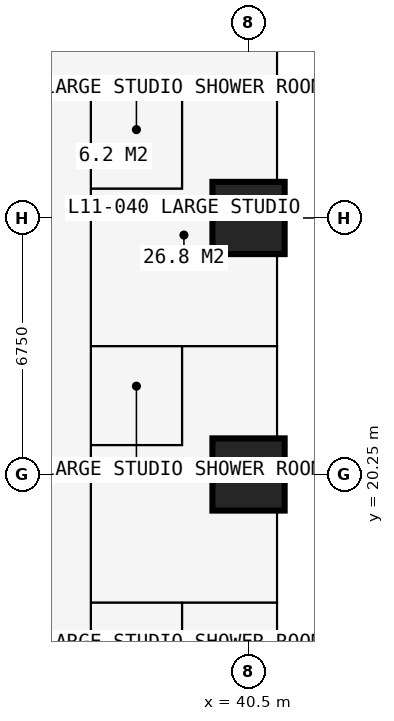
"""IFC4 building model, lengths in metres.
Left out: names, types, materials, properties, quantities, classifications, styles, units other than length and angle.
Written with IfcOpenShell. Run it as: python <this file> out.ifc"""

import sys

from ifc_helpers import new_model, si_unit, direction, frame, frame_2d, origin, origin_2d, place, context, subcontext, project, spatial, rectangle, extrude, element, fill, save


model = new_model("IFC4")
c1 = context("Model", 3, precision=1e-05, world=origin(), true_north=direction((0.0, 1.0)))
c2 = subcontext(c1, "Body", "Model", "MODEL_VIEW")
j1 = project(units=[si_unit("LENGTHUNIT", "METRE"), si_unit("PLANEANGLEUNIT", "RADIAN")], contexts=[c1])
p1 = place(None, origin())
s1 = spatial("IfcSite", under=j1, at=p1, CompositionType="ELEMENT")
p2 = place(p1, origin())
s2 = spatial("IfcBuilding", under=s1, at=p2, CompositionType="ELEMENT")
p3 = place(p2, frame((0.0, 0.0, 43.2)))
s3 = spatial("IfcBuildingStorey", under=s2, at=p3, CompositionType="ELEMENT", Elevation=43.2)
for number, where, z_axis, x_axis in (
    (1, (40.5, 20.25, 0.0), (0.0, 0.0, 1.0), (1.0, 0.0, 0.0)),
    (2, (40.5, 27.0, 0.0), (0.0, 0.0, 1.0), (1.0, 0.0, 0.0)),
):
    element("IfcColumn", number, at=place(p3, frame(where, z_axis=z_axis, x_axis=x_axis)), inside=s3, PredefinedType="COLUMN", context=c2, shape_type="SweptSolid", body=[
        extrude(rectangle(XDim=1.9, YDim=1.9, at=origin_2d()), origin(), (0.0, 0.0, 1.0), 3.6),
    ])
p4 = place(p3, frame((41.25, 27.0, 0.0), z_axis=(0.0, 0.0, 1.0), x_axis=(0.0, -1.0, 0.0)))
e3 = element("IfcWall", 3, at=p4, inside=s3, PredefinedType="SOLIDWALL", context=c2, shape_type="SweptSolid", body=[
    extrude(rectangle(XDim=6.75, YDim=0.15, at=frame_2d((3.375, 0.0))), origin(), (0.0, 0.0, 1.0), 3.375),
])
p5 = place(p4, frame((0.996, 0.0, 0.0)))
e4 = element("IfcOpeningElement", 4, at=p5, cuts=e3, PredefinedType="OPENING", context=c2, shape_type="SweptSolid", body=[
    extrude(rectangle(XDim=1.0, YDim=2.2, at=frame_2d((0.5, 1.1))), frame((0.0, 0.085, 0.0), z_axis=(0.0, -1.0, 0.0), x_axis=(1.0, 0.0, 0.0)), (0.0, 0.0, 1.0), 0.17),
])
p6 = place(p4, frame((2.042, 0.0, 0.9)))
e5 = element("IfcOpeningElement", 5, at=p6, cuts=e3, PredefinedType="OPENING", context=c2, shape_type="SweptSolid", body=[
    extrude(rectangle(XDim=1.2, YDim=1.8, at=frame_2d((0.6, 0.9))), frame((0.0, 0.085, 0.0), z_axis=(0.0, -1.0, 0.0), x_axis=(1.0, 0.0, 0.0)), (0.0, 0.0, 1.0), 0.17),
])
p7 = place(p4, frame((4.754, 0.0, 0.0)))
e6 = element("IfcOpeningElement", 6, at=p7, cuts=e3, PredefinedType="OPENING", context=c2, shape_type="SweptSolid", body=[
    extrude(rectangle(XDim=1.0, YDim=2.2, at=frame_2d((0.5, 1.1))), frame((0.0, 0.085, 0.0), z_axis=(0.0, -1.0, 0.0), x_axis=(1.0, 0.0, 0.0)), (0.0, 0.0, 1.0), 0.17),
])
p8 = place(p4, frame((3.508, 0.0, 0.9)))
e7 = element("IfcOpeningElement", 7, at=p8, cuts=e3, PredefinedType="OPENING", context=c2, shape_type="SweptSolid", body=[
    extrude(rectangle(XDim=1.2, YDim=1.8, at=frame_2d((0.6, 0.9))), frame((0.0, 0.085, 0.0), z_axis=(0.0, -1.0, 0.0), x_axis=(1.0, 0.0, 0.0)), (0.0, 0.0, 1.0), 0.17),
])
p9 = place(p3, frame((41.35, 23.625, 0.0), z_axis=(0.0, 0.0, 1.0), x_axis=(1.0, 0.0, 0.0)))
e8 = element("IfcWall", 8, at=p9, inside=s3, PredefinedType="USERDEFINED", context=c2, shape_type="SweptSolid", body=[
    extrude(rectangle(XDim=2.2, YDim=1.0, at=frame_2d((1.1, 0.0))), origin(), (0.0, 0.0, 1.0), 0.9),
])
p10 = place(p3, frame((30.375, 30.375, 0.0), z_axis=(0.0, 0.0, 1.0), x_axis=(1.0, 0.0, 0.0)))
e9 = element("IfcWall", 9, at=p10, inside=s3, PredefinedType="PARTITIONING", context=c2, shape_type="SweptSolid", body=[
    extrude(rectangle(XDim=10.859, YDim=0.15, at=frame_2d((5.429, 0.0))), origin(), (0.0, 0.0, 1.0), 3.375),
])
p11 = place(p3, frame((36.35, 6.75, 0.0), z_axis=(0.0, 0.0, 1.0), x_axis=(0.0, 1.0, 0.0)))
e10 = element("IfcWall", 10, at=p11, inside=s3, PredefinedType="PARTITIONING", context=c2, shape_type="SweptSolid", body=[
    extrude(rectangle(XDim=23.625, YDim=0.15, at=frame_2d((11.812, 0.0))), origin(), (0.0, 0.0, 1.0), 3.375),
])
p12 = place(p11, frame((0.2, 0.0, 0.0)))
e11 = element("IfcOpeningElement", 11, at=p12, cuts=e10, PredefinedType="OPENING", context=c2, shape_type="SweptSolid", body=[
    extrude(rectangle(XDim=0.95, YDim=2.2, at=frame_2d((0.475, 1.1))), frame((0.0, 0.085, 0.0), z_axis=(0.0, -1.0, 0.0), x_axis=(1.0, 0.0, 0.0)), (0.0, 0.0, 1.0), 0.17),
])
p13 = place(p11, frame((18.475, 0.0, 0.0)))
e12 = element("IfcOpeningElement", 12, at=p13, cuts=e10, PredefinedType="OPENING", context=c2, shape_type="SweptSolid", body=[
    extrude(rectangle(XDim=0.95, YDim=2.2, at=frame_2d((0.475, 1.1))), frame((0.0, 0.085, 0.0), z_axis=(0.0, -1.0, 0.0), x_axis=(1.0, 0.0, 0.0)), (0.0, 0.0, 1.0), 0.17),
])
p14 = place(p11, frame((11.725, 0.0, 0.0)))
e13 = element("IfcOpeningElement", 13, at=p14, cuts=e10, PredefinedType="OPENING", context=c2, shape_type="SweptSolid", body=[
    extrude(rectangle(XDim=0.95, YDim=2.2, at=frame_2d((0.475, 1.1))), frame((0.0, 0.085, 0.0), z_axis=(0.0, -1.0, 0.0), x_axis=(1.0, 0.0, 0.0)), (0.0, 0.0, 1.0), 0.17),
])
p15 = place(p11, frame((4.975, 0.0, 0.0)))
e14 = element("IfcOpeningElement", 14, at=p15, cuts=e10, PredefinedType="OPENING", context=c2, shape_type="SweptSolid", body=[
    extrude(rectangle(XDim=0.95, YDim=2.2, at=frame_2d((0.475, 1.1))), frame((0.0, 0.085, 0.0), z_axis=(0.0, -1.0, 0.0), x_axis=(1.0, 0.0, 0.0)), (0.0, 0.0, 1.0), 0.17),
])
p16 = place(p3, frame((36.35, 16.875, 0.0), z_axis=(0.0, 0.0, 1.0), x_axis=(1.0, 0.0, 0.0)))
e15 = element("IfcWall", 15, at=p16, inside=s3, PredefinedType="PARTITIONING", context=c2, shape_type="SweptSolid", body=[
    extrude(rectangle(XDim=4.884, YDim=0.175, at=frame_2d((2.442, 0.0))), origin(), (0.0, 0.0, 1.0), 3.375),
])
p17 = place(p16, frame((0.75, 0.0, 0.0)))
e16 = element("IfcOpeningElement", 16, at=p17, cuts=e15, PredefinedType="OPENING", context=c2, shape_type="SweptSolid", body=[
    extrude(rectangle(XDim=0.9, YDim=2.2, at=frame_2d((0.45, 1.1))), frame((0.0, 0.097, 0.0), z_axis=(0.0, -1.0, 0.0), x_axis=(1.0, 0.0, 0.0)), (0.0, 0.0, 1.0), 0.195),
])
p18 = place(p3, frame((36.35, 21.025, 0.0), z_axis=(0.0, 0.0, 1.0), x_axis=(1.0, 0.0, 0.0)))
e17 = element("IfcWall", 17, at=p18, inside=s3, PredefinedType="PARTITIONING", context=c2, shape_type="SweptSolid", body=[
    extrude(rectangle(XDim=2.4, YDim=0.1, at=frame_2d((1.2, 0.0))), origin(), (0.0, 0.0, 1.0), 3.375),
])
p19 = place(p3, frame((36.35, 23.625, 0.0), z_axis=(0.0, 0.0, 1.0), x_axis=(1.0, 0.0, 0.0)))
e18 = element("IfcWall", 18, at=p19, inside=s3, PredefinedType="PARTITIONING", context=c2, shape_type="SweptSolid", body=[
    extrude(rectangle(XDim=4.884, YDim=0.175, at=frame_2d((2.442, 0.0))), origin(), (0.0, 0.0, 1.0), 3.375),
])
p20 = place(p19, frame((0.75, 0.0, 0.0)))
e19 = element("IfcOpeningElement", 19, at=p20, cuts=e18, PredefinedType="OPENING", context=c2, shape_type="SweptSolid", body=[
    extrude(rectangle(XDim=0.9, YDim=2.2, at=frame_2d((0.45, 1.1))), frame((0.0, 0.097, 0.0), z_axis=(0.0, -1.0, 0.0), x_axis=(1.0, 0.0, 0.0)), (0.0, 0.0, 1.0), 0.195),
])
p21 = place(p3, frame((36.35, 27.775, 0.0), z_axis=(0.0, 0.0, 1.0), x_axis=(1.0, 0.0, 0.0)))
e20 = element("IfcWall", 20, at=p21, inside=s3, PredefinedType="PARTITIONING", context=c2, shape_type="SweptSolid", body=[
    extrude(rectangle(XDim=2.4, YDim=0.1, at=frame_2d((1.2, 0.0))), origin(), (0.0, 0.0, 1.0), 3.375),
])
for number, where, z_axis, x_axis in (
    (21, (38.75, 14.275, 0.0), (0.0, 0.0, 1.0), (0.0, 1.0, 0.0)),
    (22, (38.75, 21.025, 0.0), (0.0, 0.0, 1.0), (0.0, 1.0, 0.0)),
):
    element("IfcWall", number, at=place(p3, frame(where, z_axis=z_axis, x_axis=x_axis)), inside=s3, PredefinedType="PARTITIONING", context=c2, shape_type="SweptSolid", body=[
        extrude(rectangle(XDim=2.6, YDim=0.1, at=frame_2d((1.3, 0.0))), origin(), (0.0, 0.0, 1.0), 3.375),
    ])
p22 = place(p3, frame((38.75, 27.775, 0.0), z_axis=(0.0, 0.0, 1.0), x_axis=(0.0, 1.0, 0.0)))
e23 = element("IfcWall", 23, at=p22, inside=s3, PredefinedType="PARTITIONING", context=c2, shape_type="SweptSolid", body=[
    extrude(rectangle(XDim=2.6, YDim=0.1, at=frame_2d((1.3, 0.0))), origin(), (0.0, 0.0, 1.0), 3.375),
])
p23 = place(p22, frame((0.85, 0.0, 0.0)))
e24 = element("IfcOpeningElement", 24, at=p23, cuts=e23, PredefinedType="OPENING", context=c2, shape_type="SweptSolid", body=[
    extrude(rectangle(XDim=0.9, YDim=2.2, at=frame_2d((0.45, 1.1))), frame((0.0, 0.06, 0.0), z_axis=(0.0, -1.0, 0.0), x_axis=(1.0, 0.0, 0.0)), (0.0, 0.0, 1.0), 0.12),
])
p24 = place(p5, origin())
e25 = element("IfcDoor", 25, at=p24, inside=s3, OperationType="SINGLE_SWING_LEFT", PredefinedType="DOOR", context=c2, shape_type="SweptSolid", body=[
    extrude(rectangle(XDim=1.0, YDim=2.2, at=frame_2d((0.5, 1.1))), frame((0.0, 0.025, 0.0), z_axis=(0.0, -1.0, 0.0), x_axis=(1.0, 0.0, 0.0)), (0.0, 0.0, 1.0), 0.05),
])
fill(e4, e25)
p25 = place(p6, origin())
e26 = element("IfcWindow", 26, at=p25, inside=s3, PartitioningType="SINGLE_PANEL", PredefinedType="WINDOW", context=c2, shape_type="SweptSolid", body=[
    extrude(rectangle(XDim=1.2, YDim=1.8, at=frame_2d((0.6, 0.9))), frame((0.0, 0.03, 0.0), z_axis=(0.0, -1.0, 0.0), x_axis=(1.0, 0.0, 0.0)), (0.0, 0.0, 1.0), 0.06),
])
fill(e5, e26)
p26 = place(p7, origin())
e27 = element("IfcDoor", 27, at=p26, inside=s3, OperationType="SINGLE_SWING_RIGHT", PredefinedType="DOOR", context=c2, shape_type="SweptSolid", body=[
    extrude(rectangle(XDim=1.0, YDim=2.2, at=frame_2d((0.5, 1.1))), frame((0.0, 0.025, 0.0), z_axis=(0.0, -1.0, 0.0), x_axis=(1.0, 0.0, 0.0)), (0.0, 0.0, 1.0), 0.05),
])
fill(e6, e27)
p27 = place(p8, origin())
e28 = element("IfcWindow", 28, at=p27, inside=s3, PartitioningType="SINGLE_PANEL", PredefinedType="WINDOW", context=c2, shape_type="SweptSolid", body=[
    extrude(rectangle(XDim=1.2, YDim=1.8, at=frame_2d((0.6, 0.9))), frame((0.0, 0.03, 0.0), z_axis=(0.0, -1.0, 0.0), x_axis=(1.0, 0.0, 0.0)), (0.0, 0.0, 1.0), 0.06),
])
fill(e7, e28)
p28 = place(p13, origin())
e29 = element("IfcDoor", 29, at=p28, inside=s3, OperationType="SINGLE_SWING_LEFT", PredefinedType="DOOR", context=c2, shape_type="SweptSolid", body=[
    extrude(rectangle(XDim=0.95, YDim=2.2, at=frame_2d((0.475, 1.1))), frame((0.0, 0.025, 0.0), z_axis=(0.0, -1.0, 0.0), x_axis=(1.0, 0.0, 0.0)), (0.0, 0.0, 1.0), 0.05),
])
fill(e12, e29)
p29 = place(p23, origin())
e30 = element("IfcDoor", 30, at=p29, inside=s3, OperationType="SINGLE_SWING_RIGHT", PredefinedType="DOOR", context=c2, shape_type="SweptSolid", body=[
    extrude(rectangle(XDim=0.9, YDim=2.2, at=frame_2d((0.45, 1.1))), frame((0.0, 0.025, 0.0), z_axis=(0.0, -1.0, 0.0), x_axis=(1.0, 0.0, 0.0)), (0.0, 0.0, 1.0), 0.05),
])
fill(e24, e30)
p30 = place(p14, origin())
e31 = element("IfcDoor", 31, at=p30, inside=s3, OperationType="SINGLE_SWING_LEFT", PredefinedType="DOOR", context=c2, shape_type="SweptSolid", body=[
    extrude(rectangle(XDim=0.95, YDim=2.2, at=frame_2d((0.475, 1.1))), frame((0.0, 0.025, 0.0), z_axis=(0.0, -1.0, 0.0), x_axis=(1.0, 0.0, 0.0)), (0.0, 0.0, 1.0), 0.05),
])
fill(e13, e31)
p31 = place(p20, origin())
e32 = element("IfcDoor", 32, at=p31, inside=s3, OperationType="SINGLE_SWING_RIGHT", PredefinedType="DOOR", context=c2, shape_type="SweptSolid", body=[
    extrude(rectangle(XDim=0.9, YDim=2.2, at=frame_2d((0.45, 1.1))), frame((0.0, 0.025, 0.0), z_axis=(0.0, -1.0, 0.0), x_axis=(1.0, 0.0, 0.0)), (0.0, 0.0, 1.0), 0.05),
])
fill(e19, e32)
p32 = place(p17, origin())
e33 = element("IfcDoor", 33, at=p32, inside=s3, OperationType="SINGLE_SWING_RIGHT", PredefinedType="DOOR", context=c2, shape_type="SweptSolid", body=[
    extrude(rectangle(XDim=0.9, YDim=2.2, at=frame_2d((0.45, 1.1))), frame((0.0, 0.025, 0.0), z_axis=(0.0, -1.0, 0.0), x_axis=(1.0, 0.0, 0.0)), (0.0, 0.0, 1.0), 0.05),
])
fill(e16, e33)
save(model, sys.argv[1])
